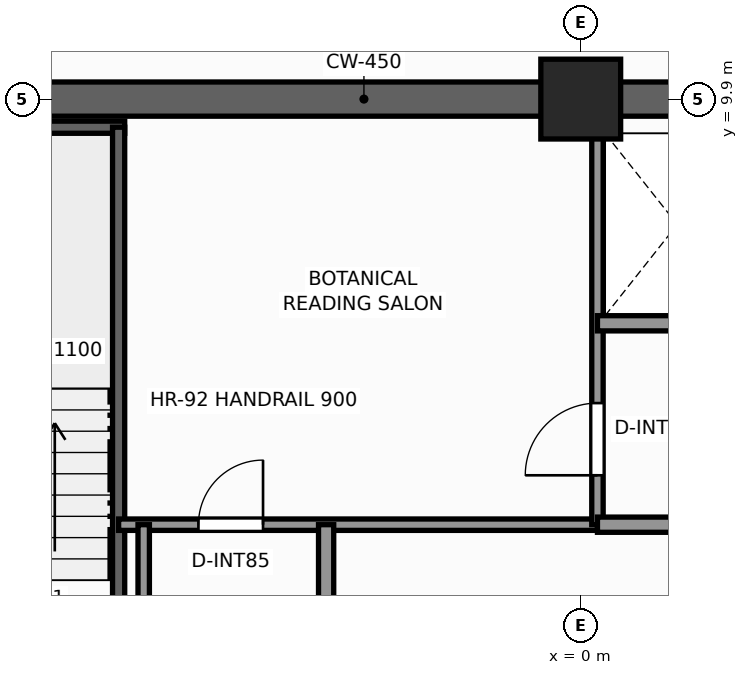
"""IFC4 building model, lengths in metres.
Left out: names, types, materials, properties, quantities, classifications, styles, units other than length and angle.
Written with IfcOpenShell. Run it as: python <this file> out.ifc"""

import sys

from ifc_helpers import new_model, si_unit, direction, frame, frame_2d, origin, origin_2d, place, context, subcontext, project, spatial, rectangle, extrude, element, fill, save


model = new_model("IFC4")
c1 = context("Model", 3, precision=1e-05, world=origin(), true_north=direction((0.0, 1.0)))
c2 = subcontext(c1, "Body", "Model", "MODEL_VIEW")
j1 = project(units=[si_unit("LENGTHUNIT", "METRE"), si_unit("PLANEANGLEUNIT", "RADIAN")], contexts=[c1])
p1 = place(None, origin())
s1 = spatial("IfcSite", under=j1, at=p1, CompositionType="ELEMENT")
p2 = place(p1, origin())
s2 = spatial("IfcBuilding", under=s1, at=p2, CompositionType="ELEMENT")
p3 = place(p2, frame((0.0, 0.0, 229.5)))
s3 = spatial("IfcBuildingStorey", under=s2, at=p3, CompositionType="ELEMENT", Elevation=229.5)
p4 = place(p3, frame((-10.125, 9.9, 0.0), z_axis=(0.0, 0.0, 1.0), x_axis=(1.0, 0.0, 0.0)))
e1 = element("IfcWall", 1, at=p4, inside=s3, PredefinedType="SHEAR", context=c2, shape_type="SweptSolid", body=[
    extrude(rectangle(XDim=14.545, YDim=0.45, at=frame_2d((7.272, 0.0))), origin(), (0.0, 0.0, 1.0), 3.3),
])
p5 = place(p3, frame((0.0, 9.9, 0.0), z_axis=(0.0, 0.0, 1.0), x_axis=(1.0, 0.0, 0.0)))
e2 = element("IfcColumn", 2, at=p5, inside=s3, PredefinedType="COLUMN", context=c2, shape_type="SweptSolid", body=[
    extrude(rectangle(XDim=1.05, YDim=1.05, at=origin_2d()), origin(), (0.0, 0.0, 1.0), 3.3),
])
p6 = place(p3, frame((-9.52, 9.53, 0.0), z_axis=(0.0, 0.0, 1.0), x_axis=(1.0, 0.0, 0.0)))
e3 = element("IfcWall", 3, at=p6, inside=s3, PredefinedType="SHEAR", context=c2, shape_type="SweptSolid", body=[
    extrude(rectangle(XDim=3.52, YDim=0.16, at=frame_2d((1.76, 0.0))), origin(), (0.0, 0.0, 1.0), 3.3),
])
p7 = place(p3, frame((-6.08, 1.97, 0.0), z_axis=(0.0, 0.0, 1.0), x_axis=(0.0, 1.0, 0.0)))
e4 = element("IfcWall", 4, at=p7, inside=s3, PredefinedType="SHEAR", context=c2, shape_type="SweptSolid", body=[
    extrude(rectangle(XDim=7.56, YDim=0.16, at=frame_2d((3.78, 0.0))), origin(), (0.0, 0.0, 1.0), 3.3),
])
p8 = place(p3, frame((-6.08, 4.3, 0.0), z_axis=(0.0, 0.0, 1.0), x_axis=(1.0, 0.0, 0.0)))
e5 = element("IfcWall", 5, at=p8, inside=s3, PredefinedType="PARTITIONING", context=c2, shape_type="SweptSolid", body=[
    extrude(rectangle(XDim=6.3, YDim=0.15, at=frame_2d((3.15, 0.0))), origin(), (0.0, 0.0, 1.0), 2.95),
])
p9 = place(p8, frame((1.05, 0.0, 0.0)))
e6 = element("IfcOpeningElement", 6, at=p9, cuts=e5, PredefinedType="OPENING", context=c2, shape_type="SweptSolid", body=[
    extrude(rectangle(XDim=0.85, YDim=2.03, at=frame_2d((0.425, 1.015))), frame((0.0, 0.085, 0.0), z_axis=(0.0, -1.0, 0.0), x_axis=(1.0, 0.0, 0.0)), (0.0, 0.0, 1.0), 0.17),
])
p10 = place(p3, frame((0.22, 4.3, 0.0), z_axis=(0.0, 0.0, 1.0), x_axis=(0.0, 1.0, 0.0)))
e7 = element("IfcWall", 7, at=p10, inside=s3, PredefinedType="PARTITIONING", context=c2, shape_type="SweptSolid", body=[
    extrude(rectangle(XDim=5.22, YDim=0.15, at=frame_2d((2.61, 0.0))), origin(), (0.0, 0.0, 1.0), 2.95),
])
p11 = place(p10, frame((0.65, 0.0, 0.0)))
e8 = element("IfcOpeningElement", 8, at=p11, cuts=e7, PredefinedType="OPENING", context=c2, shape_type="SweptSolid", body=[
    extrude(rectangle(XDim=0.95, YDim=2.06, at=frame_2d((0.475, 1.03))), frame((0.0, 0.085, 0.0), z_axis=(0.0, -1.0, 0.0), x_axis=(1.0, 0.0, 0.0)), (0.0, 0.0, 1.0), 0.17),
])
p12 = place(p3, frame((0.22, 6.95, 0.0), z_axis=(0.0, 0.0, 1.0), x_axis=(1.0, 0.0, 0.0)))
e9 = element("IfcWall", 9, at=p12, inside=s3, PredefinedType="SOLIDWALL", context=c2, shape_type="SweptSolid", body=[
    extrude(rectangle(XDim=4.18, YDim=0.2, at=frame_2d((2.09, 0.0))), origin(), (0.0, 0.0, 1.0), 2.95),
])
p13 = place(p3, frame((0.22, 4.3, 0.0), z_axis=(0.0, 0.0, 1.0), x_axis=(1.0, 0.0, 0.0)))
e10 = element("IfcWall", 10, at=p13, inside=s3, PredefinedType="SOLIDWALL", context=c2, shape_type="SweptSolid", body=[
    extrude(rectangle(XDim=3.13, YDim=0.2, at=frame_2d((1.565, 0.0))), origin(), (0.0, 0.0, 1.0), 2.95),
])
p14 = place(p13, frame((1.05, 0.0, 0.0)))
e11 = element("IfcOpeningElement", 11, at=p14, cuts=e10, PredefinedType="OPENING", context=c2, shape_type="SweptSolid", body=[
    extrude(rectangle(XDim=0.95, YDim=2.06, at=frame_2d((0.475, 1.03))), frame((0.0, 0.11, 0.0), z_axis=(0.0, -1.0, 0.0), x_axis=(1.0, 0.0, 0.0)), (0.0, 0.0, 1.0), 0.22),
])
p15 = place(p3, frame((-3.35, 1.1, 0.0), z_axis=(0.0, 0.0, 1.0), x_axis=(0.0, 1.0, 0.0)))
e12 = element("IfcWall", 12, at=p15, inside=s3, PredefinedType="SOLIDWALL", context=c2, shape_type="SweptSolid", body=[
    extrude(rectangle(XDim=3.2, YDim=0.2, at=frame_2d((1.6, 0.0))), origin(), (0.0, 0.0, 1.0), 2.95),
])
p16 = place(p3, frame((-5.75, 1.97, 0.0), z_axis=(0.0, 0.0, 1.0), x_axis=(0.0, 1.0, 0.0)))
e13 = element("IfcWall", 13, at=p16, inside=s3, PredefinedType="PARTITIONING", context=c2, shape_type="SweptSolid", body=[
    extrude(rectangle(XDim=2.33, YDim=0.15, at=frame_2d((1.165, 0.0))), origin(), (0.0, 0.0, 1.0), 2.95),
])
p17 = place(p11, origin())
e14 = element("IfcDoor", 14, at=p17, inside=s3, OperationType="SINGLE_SWING_LEFT", PredefinedType="DOOR", context=c2, shape_type="SweptSolid", body=[
    extrude(rectangle(XDim=0.95, YDim=2.06, at=frame_2d((0.475, 1.03))), frame((0.0, 0.025, 0.0), z_axis=(0.0, -1.0, 0.0), x_axis=(1.0, 0.0, 0.0)), (0.0, 0.0, 1.0), 0.05),
])
fill(e8, e14)
p18 = place(p9, origin())
e15 = element("IfcDoor", 15, at=p18, inside=s3, OperationType="SINGLE_SWING_RIGHT", PredefinedType="DOOR", context=c2, shape_type="SweptSolid", body=[
    extrude(rectangle(XDim=0.85, YDim=2.03, at=frame_2d((0.425, 1.015))), frame((0.0, 0.025, 0.0), z_axis=(0.0, -1.0, 0.0), x_axis=(1.0, 0.0, 0.0)), (0.0, 0.0, 1.0), 0.05),
])
fill(e6, e15)
save(model, sys.argv[1])
